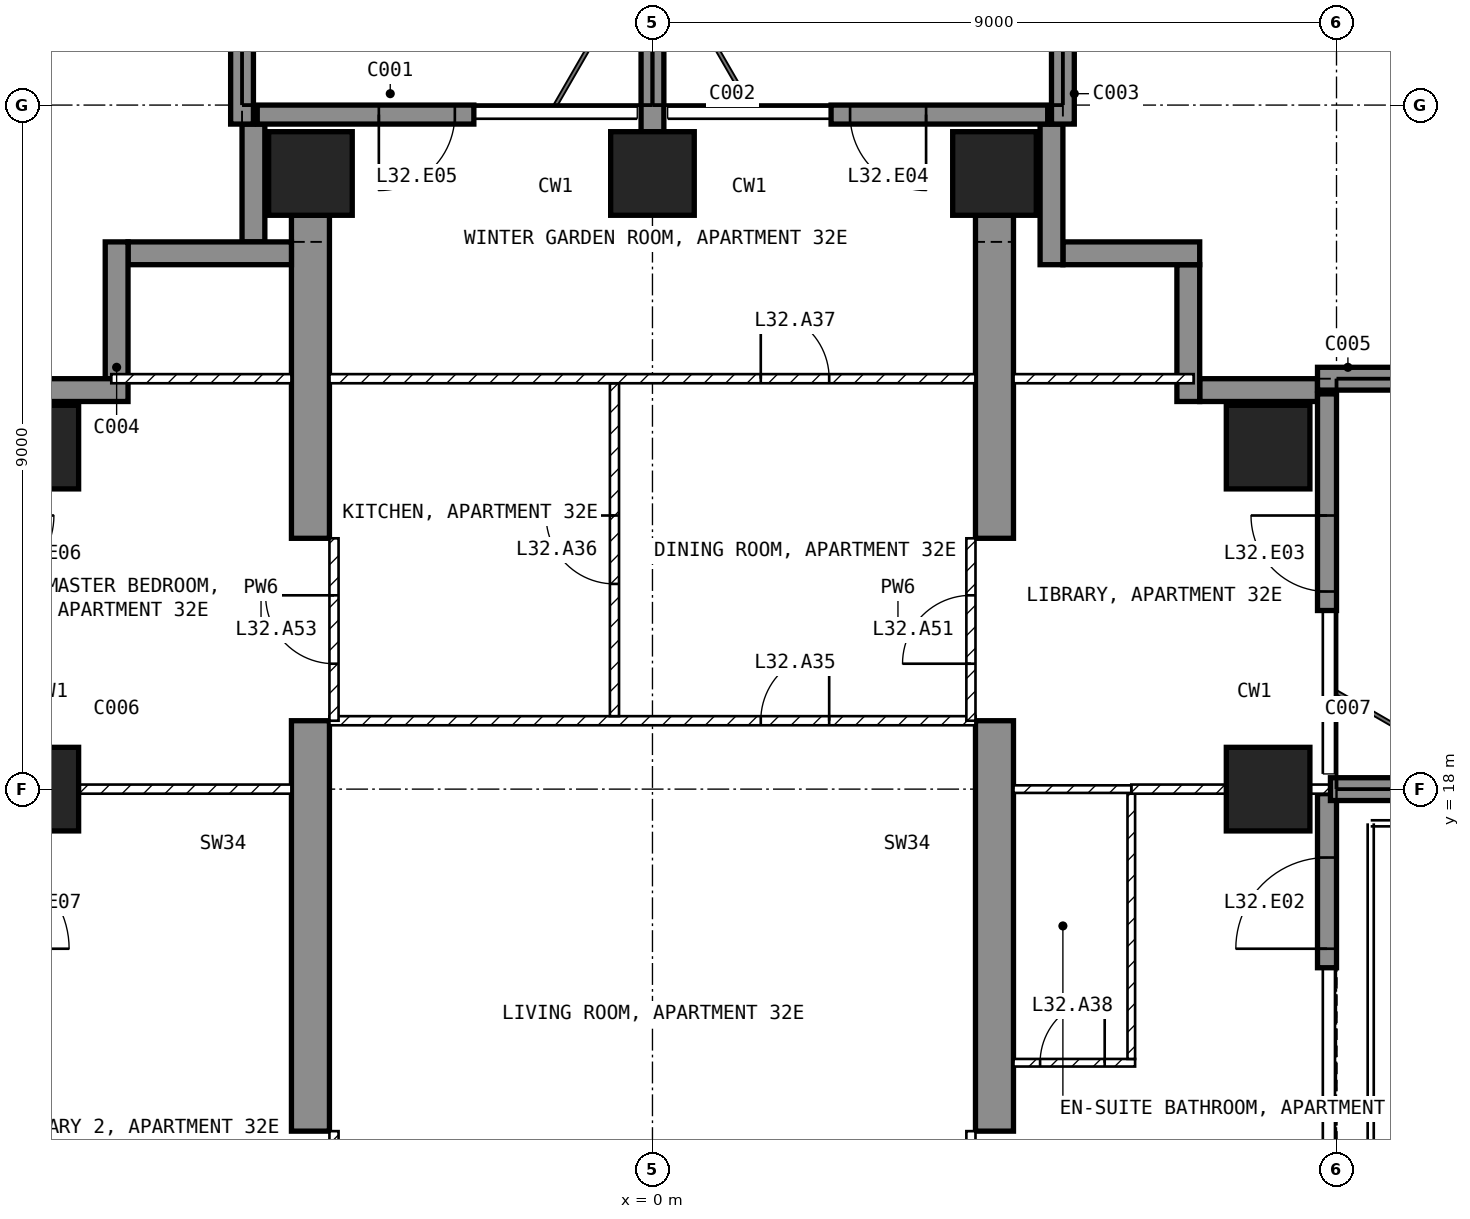
"""IFC4 building model, lengths in metres.
Left out: names, types, materials, properties, quantities, classifications, styles, units other than length and angle.
Written with IfcOpenShell. Run it as: python <this file> out.ifc"""

import sys

from ifc_helpers import new_model, si_unit, direction, frame, frame_2d, origin, origin_2d, place, context, subcontext, project, spatial, polyline, rectangle, outline, extrude, element, fill, save


model = new_model("IFC4")
c1 = context("Model", 3, precision=1e-05, world=origin(), true_north=direction((0.0, 1.0)))
c2 = subcontext(c1, "Body", "Model", "MODEL_VIEW")
j1 = project(units=[si_unit("LENGTHUNIT", "METRE"), si_unit("PLANEANGLEUNIT", "RADIAN")], contexts=[c1])
p1 = place(None, origin())
s1 = spatial("IfcSite", under=j1, at=p1, CompositionType="ELEMENT")
p2 = place(p1, origin())
s2 = spatial("IfcBuilding", under=s1, at=p2, CompositionType="ELEMENT")
p3 = place(p2, frame((0.0, 0.0, 133.9)))
s3 = spatial("IfcBuildingStorey", under=s2, at=p3, CompositionType="ELEMENT", Elevation=133.9)
for number, where, z_axis, x_axis in (
    (1, (-8.1, 18.0, -0.25), (0.0, 0.0, 1.0), (1.0, 0.0, 0.0)),
    (2, (-8.1, 22.5, -0.25), (0.0, 0.0, 1.0), (1.0, 0.0, 0.0)),
    (3, (-4.5, 26.1, -0.25), (0.0, 0.0, 1.0), (1.0, 0.0, 0.0)),
    (4, (0.0, 26.1, -0.25), (0.0, 0.0, 1.0), (1.0, 0.0, 0.0)),
    (5, (4.5, 26.1, -0.25), (0.0, 0.0, 1.0), (1.0, 0.0, 0.0)),
    (6, (8.1, 18.0, -0.25), (0.0, 0.0, 1.0), (1.0, 0.0, 0.0)),
    (7, (8.1, 22.5, -0.25), (0.0, 0.0, 1.0), (1.0, 0.0, 0.0)),
):
    element("IfcColumn", number, at=place(p3, frame(where, z_axis=z_axis, x_axis=x_axis)), inside=s3, PredefinedType="COLUMN", context=c2, shape_type="SweptSolid", body=[
        extrude(rectangle(XDim=1.1, YDim=1.1, at=origin_2d()), origin(), (0.0, 0.0, 1.0), 3.5),
    ])
for number, where, z_axis, x_axis in (
    (8, (-4.75, 9.0, -0.25), (1.0, 0.0, 0.0), (0.0, 1.0, 0.0)),
    (9, (4.25, 9.0, -0.25), (1.0, 0.0, 0.0), (0.0, 1.0, 0.0)),
):
    element("IfcWall", number, at=place(p3, frame(where, z_axis=z_axis, x_axis=x_axis)), inside=s3, PredefinedType="SHEAR", context=c2, shape_type="SweptSolid", body=[
        extrude(outline(polyline([(0.0, 0.0), (2.1, 0.0), (2.1, 2.65), (4.5, 2.65), (4.5, 0.0), (9.9, 0.0), (9.9, 2.65), (12.3, 2.65), (12.3, 0.0), (16.55, 0.0), (16.55, 3.5), (0.0, 3.5), (0.0, 0.0)])), origin(), (0.0, 0.0, 1.0), 0.5),
    ])
p4 = place(p3, frame((8.875, 15.65, 0.0), z_axis=(0.0, 0.0, 1.0), x_axis=(0.0, 1.0, 0.0)))
e10 = element("IfcWall", 10, at=p4, inside=s3, PredefinedType="SOLIDWALL", context=c2, shape_type="SweptSolid", body=[
    extrude(rectangle(XDim=2.29, YDim=0.25, at=frame_2d((1.145, 0.0))), origin(), (0.0, 0.0, 1.0), 3.25),
])
p5 = place(p4, frame((0.25, 0.0, 0.0)))
e11 = element("IfcOpeningElement", 11, at=p5, cuts=e10, PredefinedType="OPENING", context=c2, shape_type="SweptSolid", body=[
    extrude(rectangle(XDim=1.2, YDim=2.4, at=frame_2d((0.6, 1.2))), frame((0.0, 0.135, 0.0), z_axis=(0.0, -1.0, 0.0), x_axis=(1.0, 0.0, 0.0)), (0.0, 0.0, 1.0), 0.27),
])
p6 = place(p3, frame((8.875, 20.35, 0.0), z_axis=(0.0, 0.0, 1.0), x_axis=(0.0, 1.0, 0.0)))
e12 = element("IfcWall", 12, at=p6, inside=s3, PredefinedType="SOLIDWALL", context=c2, shape_type="SweptSolid", body=[
    extrude(rectangle(XDim=2.85, YDim=0.25, at=frame_2d((1.425, 0.0))), origin(), (0.0, 0.0, 1.0), 3.25),
])
p7 = place(p6, frame((0.25, 0.0, 0.0)))
e13 = element("IfcOpeningElement", 13, at=p7, cuts=e12, PredefinedType="OPENING", context=c2, shape_type="SweptSolid", body=[
    extrude(rectangle(XDim=1.0, YDim=2.4, at=frame_2d((0.5, 1.2))), frame((0.0, 0.135, 0.0), z_axis=(0.0, -1.0, 0.0), x_axis=(1.0, 0.0, 0.0)), (0.0, 0.0, 1.0), 0.27),
])
p8 = place(p3, frame((5.2, 26.875, 0.0), z_axis=(0.0, 0.0, 1.0), x_axis=(-1.0, 0.0, 0.0)))
e14 = element("IfcWall", 14, at=p8, inside=s3, PredefinedType="SOLIDWALL", context=c2, shape_type="SweptSolid", body=[
    extrude(rectangle(XDim=2.85, YDim=0.25, at=frame_2d((1.425, 0.0))), origin(), (0.0, 0.0, 1.0), 3.25),
])
p9 = place(p8, frame((1.6, 0.0, 0.0)))
e15 = element("IfcOpeningElement", 15, at=p9, cuts=e14, PredefinedType="OPENING", context=c2, shape_type="SweptSolid", body=[
    extrude(rectangle(XDim=1.0, YDim=2.4, at=frame_2d((0.5, 1.2))), frame((0.0, 0.135, 0.0), z_axis=(0.0, -1.0, 0.0), x_axis=(1.0, 0.0, 0.0)), (0.0, 0.0, 1.0), 0.27),
])
p10 = place(p3, frame((-2.35, 26.875, 0.0), z_axis=(0.0, 0.0, 1.0), x_axis=(-1.0, 0.0, 0.0)))
e16 = element("IfcWall", 16, at=p10, inside=s3, PredefinedType="SOLIDWALL", context=c2, shape_type="SweptSolid", body=[
    extrude(rectangle(XDim=2.85, YDim=0.25, at=frame_2d((1.425, 0.0))), origin(), (0.0, 0.0, 1.0), 3.25),
])
p11 = place(p10, frame((0.25, 0.0, 0.0)))
e17 = element("IfcOpeningElement", 17, at=p11, cuts=e16, PredefinedType="OPENING", context=c2, shape_type="SweptSolid", body=[
    extrude(rectangle(XDim=1.0, YDim=2.4, at=frame_2d((0.5, 1.2))), frame((0.0, 0.135, 0.0), z_axis=(0.0, -1.0, 0.0), x_axis=(1.0, 0.0, 0.0)), (0.0, 0.0, 1.0), 0.27),
])
p12 = place(p3, frame((8.75, 23.25, 0.0), z_axis=(0.0, 0.0, 1.0), x_axis=(-1.0, 0.0, 0.0)))
e18 = element("IfcWall", 18, at=p12, inside=s3, PredefinedType="SOLIDWALL", context=c2, shape_type="SweptSolid", body=[
    extrude(rectangle(XDim=1.55, YDim=0.3, at=frame_2d((0.775, 0.0))), origin(), (0.0, 0.0, 1.0), 3.25),
])
p13 = place(p3, frame((7.05, 23.1, 0.0), z_axis=(0.0, 0.0, 1.0), x_axis=(0.0, 1.0, 0.0)))
e19 = element("IfcWall", 19, at=p13, inside=s3, PredefinedType="SOLIDWALL", context=c2, shape_type="SweptSolid", body=[
    extrude(rectangle(XDim=1.8, YDim=0.3, at=frame_2d((0.9, 0.0))), origin(), (0.0, 0.0, 1.0), 3.25),
])
p14 = place(p3, frame((7.2, 25.05, 0.0), z_axis=(0.0, 0.0, 1.0), x_axis=(-1.0, 0.0, 0.0)))
e20 = element("IfcWall", 20, at=p14, inside=s3, PredefinedType="SOLIDWALL", context=c2, shape_type="SweptSolid", body=[
    extrude(rectangle(XDim=1.8, YDim=0.3, at=frame_2d((0.9, 0.0))), origin(), (0.0, 0.0, 1.0), 3.25),
])
p15 = place(p3, frame((5.25, 24.9, 0.0), z_axis=(0.0, 0.0, 1.0), x_axis=(0.0, 1.0, 0.0)))
e21 = element("IfcWall", 21, at=p15, inside=s3, PredefinedType="SOLIDWALL", context=c2, shape_type="SweptSolid", body=[
    extrude(rectangle(XDim=1.85, YDim=0.3, at=frame_2d((0.925, 0.0))), origin(), (0.0, 0.0, 1.0), 3.25),
])
p16 = place(p3, frame((-5.25, 26.75, 0.0), z_axis=(0.0, 0.0, 1.0), x_axis=(0.0, -1.0, 0.0)))
e22 = element("IfcWall", 22, at=p16, inside=s3, PredefinedType="SOLIDWALL", context=c2, shape_type="SweptSolid", body=[
    extrude(rectangle(XDim=1.55, YDim=0.3, at=frame_2d((0.775, 0.0))), origin(), (0.0, 0.0, 1.0), 3.25),
])
p17 = place(p3, frame((-4.75, 25.05, 0.0), z_axis=(0.0, 0.0, 1.0), x_axis=(-1.0, 0.0, 0.0)))
e23 = element("IfcWall", 23, at=p17, inside=s3, PredefinedType="SOLIDWALL", context=c2, shape_type="SweptSolid", body=[
    extrude(rectangle(XDim=2.15, YDim=0.3, at=frame_2d((1.075, 0.0))), origin(), (0.0, 0.0, 1.0), 3.25),
])
p18 = place(p3, frame((-7.05, 25.2, 0.0), z_axis=(0.0, 0.0, 1.0), x_axis=(0.0, -1.0, 0.0)))
e24 = element("IfcWall", 24, at=p18, inside=s3, PredefinedType="SOLIDWALL", context=c2, shape_type="SweptSolid", body=[
    extrude(rectangle(XDim=1.8, YDim=0.3, at=frame_2d((0.9, 0.0))), origin(), (0.0, 0.0, 1.0), 3.25),
])
p19 = place(p3, frame((-6.9, 23.25, 0.0), z_axis=(0.0, 0.0, 1.0), x_axis=(-1.0, 0.0, 0.0)))
e25 = element("IfcWall", 25, at=p19, inside=s3, PredefinedType="SOLIDWALL", context=c2, shape_type="SweptSolid", body=[
    extrude(rectangle(XDim=1.85, YDim=0.3, at=frame_2d((0.925, 0.0))), origin(), (0.0, 0.0, 1.0), 3.25),
])
p20 = place(p3, frame((-5.4, 26.75, 0.0), z_axis=(0.0, 0.0, 1.0), x_axis=(0.0, 1.0, 0.0)))
e26 = element("IfcWall", 26, at=p20, inside=s3, PredefinedType="SOLIDWALL", context=c2, shape_type="SweptSolid", body=[
    extrude(rectangle(XDim=2.95, YDim=0.3, at=frame_2d((1.475, 0.0))), origin(), (0.0, 0.0, 1.0), 3.25),
])
p21 = place(p3, frame((0.0, 26.65, 0.0), z_axis=(0.0, 0.0, 1.0), x_axis=(0.0, 1.0, 0.0)))
e27 = element("IfcWall", 27, at=p21, inside=s3, PredefinedType="SOLIDWALL", context=c2, shape_type="SweptSolid", body=[
    extrude(rectangle(XDim=3.05, YDim=0.3, at=frame_2d((1.525, 0.0))), origin(), (0.0, 0.0, 1.0), 3.25),
])
p22 = place(p3, frame((5.4, 26.75, 0.0), z_axis=(0.0, 0.0, 1.0), x_axis=(0.0, 1.0, 0.0)))
e28 = element("IfcWall", 28, at=p22, inside=s3, PredefinedType="SOLIDWALL", context=c2, shape_type="SweptSolid", body=[
    extrude(rectangle(XDim=2.95, YDim=0.3, at=frame_2d((1.475, 0.0))), origin(), (0.0, 0.0, 1.0), 3.25),
])
p23 = place(p3, frame((8.92, 18.0, 0.0), z_axis=(0.0, 0.0, 1.0), x_axis=(1.0, 0.0, 0.0)))
e29 = element("IfcWall", 29, at=p23, inside=s3, PredefinedType="SOLIDWALL", context=c2, shape_type="SweptSolid", body=[
    extrude(rectangle(XDim=2.82, YDim=0.3, at=frame_2d((1.41, 0.0))), origin(), (0.0, 0.0, 1.0), 3.25),
])
p24 = place(p3, frame((8.75, 23.4, 0.0), z_axis=(0.0, 0.0, 1.0), x_axis=(1.0, 0.0, 0.0)))
e30 = element("IfcWall", 30, at=p24, inside=s3, PredefinedType="SOLIDWALL", context=c2, shape_type="SweptSolid", body=[
    extrude(rectangle(XDim=2.95, YDim=0.3, at=frame_2d((1.475, 0.0))), origin(), (0.0, 0.0, 1.0), 3.25),
])
p25 = place(p3, frame((-4.25, 18.9, 0.0), z_axis=(0.0, 0.0, 1.0), x_axis=(1.0, 0.0, 0.0)))
e31 = element("IfcWall", 31, at=p25, inside=s3, PredefinedType="PARTITIONING", context=c2, shape_type="SweptSolid", body=[
    extrude(rectangle(XDim=8.5, YDim=0.12, at=frame_2d((4.25, 0.0))), origin(), (0.0, 0.0, 1.0), 3.25),
])
p26 = place(p25, frame((5.675, 0.0, 0.0)))
e32 = element("IfcOpeningElement", 32, at=p26, cuts=e31, PredefinedType="OPENING", context=c2, shape_type="SweptSolid", body=[
    extrude(rectangle(XDim=0.9, YDim=2.1, at=frame_2d((0.45, 1.05))), frame((0.0, 0.07, 0.0), z_axis=(0.0, -1.0, 0.0), x_axis=(1.0, 0.0, 0.0)), (0.0, 0.0, 1.0), 0.14),
])
p27 = place(p3, frame((-0.5, 18.96, 0.0), z_axis=(0.0, 0.0, 1.0), x_axis=(0.0, 1.0, 0.0)))
e33 = element("IfcWall", 33, at=p27, inside=s3, PredefinedType="PARTITIONING", context=c2, shape_type="SweptSolid", body=[
    extrude(rectangle(XDim=4.38, YDim=0.12, at=frame_2d((2.19, 0.0))), origin(), (0.0, 0.0, 1.0), 3.25),
])
p28 = place(p27, frame((1.74, 0.0, 0.0)))
e34 = element("IfcOpeningElement", 34, at=p28, cuts=e33, PredefinedType="OPENING", context=c2, shape_type="SweptSolid", body=[
    extrude(rectangle(XDim=0.9, YDim=2.1, at=frame_2d((0.45, 1.05))), frame((0.0, 0.07, 0.0), z_axis=(0.0, -1.0, 0.0), x_axis=(1.0, 0.0, 0.0)), (0.0, 0.0, 1.0), 0.14),
])
p29 = place(p3, frame((-4.25, 23.4, 0.0), z_axis=(0.0, 0.0, 1.0), x_axis=(1.0, 0.0, 0.0)))
e35 = element("IfcWall", 35, at=p29, inside=s3, PredefinedType="PARTITIONING", context=c2, shape_type="SweptSolid", body=[
    extrude(rectangle(XDim=8.5, YDim=0.12, at=frame_2d((4.25, 0.0))), origin(), (0.0, 0.0, 1.0), 3.25),
])
p30 = place(p29, frame((5.675, 0.0, 0.0)))
e36 = element("IfcOpeningElement", 36, at=p30, cuts=e35, PredefinedType="OPENING", context=c2, shape_type="SweptSolid", body=[
    extrude(rectangle(XDim=0.9, YDim=2.1, at=frame_2d((0.45, 1.05))), frame((0.0, 0.07, 0.0), z_axis=(0.0, -1.0, 0.0), x_axis=(1.0, 0.0, 0.0)), (0.0, 0.0, 1.0), 0.14),
])
p31 = place(p3, frame((4.75, 14.4, 0.0), z_axis=(0.0, 0.0, 1.0), x_axis=(1.0, 0.0, 0.0)))
e37 = element("IfcWall", 37, at=p31, inside=s3, PredefinedType="PARTITIONING", context=c2, shape_type="SweptSolid", body=[
    extrude(rectangle(XDim=1.6, YDim=0.1, at=frame_2d((0.8, 0.0))), origin(), (0.0, 0.0, 1.0), 3.25),
])
p32 = place(p31, frame((0.35, 0.0, 0.0)))
e38 = element("IfcOpeningElement", 38, at=p32, cuts=e37, PredefinedType="OPENING", context=c2, shape_type="SweptSolid", body=[
    extrude(rectangle(XDim=0.85, YDim=2.1, at=frame_2d((0.425, 1.05))), frame((0.0, 0.06, 0.0), z_axis=(0.0, -1.0, 0.0), x_axis=(1.0, 0.0, 0.0)), (0.0, 0.0, 1.0), 0.12),
])
p33 = place(p3, frame((6.3, 14.45, 0.0), z_axis=(0.0, 0.0, 1.0), x_axis=(0.0, 1.0, 0.0)))
e39 = element("IfcWall", 39, at=p33, inside=s3, PredefinedType="PARTITIONING", context=c2, shape_type="SweptSolid", body=[
    extrude(rectangle(XDim=3.49, YDim=0.1, at=frame_2d((1.745, 0.0))), origin(), (0.0, 0.0, 1.0), 3.25),
])
p34 = place(p3, frame((6.3, 18.0, 0.0), z_axis=(0.0, 0.0, 1.0), x_axis=(1.0, 0.0, 0.0)))
e40 = element("IfcWall", 40, at=p34, inside=s3, PredefinedType="PARTITIONING", context=c2, shape_type="SweptSolid", body=[
    extrude(rectangle(XDim=2.62, YDim=0.12, at=frame_2d((1.31, 0.0))), origin(), (0.0, 0.0, 1.0), 2.414),
])
p35 = place(p3, frame((4.75, 18.0, 0.0), z_axis=(0.0, 0.0, 1.0), x_axis=(1.0, 0.0, 0.0)))
e41 = element("IfcWall", 41, at=p35, inside=s3, PredefinedType="PARTITIONING", context=c2, shape_type="SweptSolid", body=[
    extrude(rectangle(XDim=1.55, YDim=0.1, at=frame_2d((0.775, 0.0))), origin(), (0.0, 0.0, 1.0), 2.414),
])
p36 = place(p3, frame((4.75, 23.4, 0.0), z_axis=(0.0, 0.0, 1.0), x_axis=(1.0, 0.0, 0.0)))
e42 = element("IfcWall", 42, at=p36, inside=s3, PredefinedType="PARTITIONING", context=c2, shape_type="SweptSolid", body=[
    extrude(rectangle(XDim=2.37, YDim=0.12, at=frame_2d((1.185, 0.0))), origin(), (0.0, 0.0, 1.0), 3.25),
])
p37 = place(p3, frame((-8.92, 18.0, 0.0), z_axis=(0.0, 0.0, 1.0), x_axis=(1.0, 0.0, 0.0)))
e43 = element("IfcWall", 43, at=p37, inside=s3, PredefinedType="PARTITIONING", context=c2, shape_type="SweptSolid", body=[
    extrude(rectangle(XDim=4.17, YDim=0.12, at=frame_2d((2.085, 0.0))), origin(), (0.0, 0.0, 1.0), 2.414),
])
p38 = place(p3, frame((-7.12, 23.4, 0.0), z_axis=(0.0, 0.0, 1.0), x_axis=(1.0, 0.0, 0.0)))
e44 = element("IfcWall", 44, at=p38, inside=s3, PredefinedType="PARTITIONING", context=c2, shape_type="SweptSolid", body=[
    extrude(rectangle(XDim=2.37, YDim=0.12, at=frame_2d((1.185, 0.0))), origin(), (0.0, 0.0, 1.0), 3.25),
])
p39 = place(p3, frame((4.19, 11.1, 0.0), z_axis=(0.0, 0.0, 1.0), x_axis=(0.0, 1.0, 0.0)))
e45 = element("IfcWall", 45, at=p39, inside=s3, PredefinedType="PARTITIONING", context=c2, shape_type="SweptSolid", body=[
    extrude(rectangle(XDim=2.4, YDim=0.12, at=frame_2d((1.2, 0.0))), origin(), (0.0, 0.0, 1.0), 2.4),
])
p40 = place(p39, frame((0.75, 0.0, 0.0)))
e46 = element("IfcOpeningElement", 46, at=p40, cuts=e45, PredefinedType="OPENING", context=c2, shape_type="SweptSolid", body=[
    extrude(rectangle(XDim=0.9, YDim=2.1, at=frame_2d((0.45, 1.05))), frame((0.0, 0.07, 0.0), z_axis=(0.0, -1.0, 0.0), x_axis=(1.0, 0.0, 0.0)), (0.0, 0.0, 1.0), 0.14),
])
p41 = place(p3, frame((4.19, 18.9, 0.0), z_axis=(0.0, 0.0, 1.0), x_axis=(0.0, 1.0, 0.0)))
e47 = element("IfcWall", 47, at=p41, inside=s3, PredefinedType="PARTITIONING", context=c2, shape_type="SweptSolid", body=[
    extrude(rectangle(XDim=2.4, YDim=0.12, at=frame_2d((1.2, 0.0))), origin(), (0.0, 0.0, 1.0), 2.4),
])
p42 = place(p41, frame((0.75, 0.0, 0.0)))
e48 = element("IfcOpeningElement", 48, at=p42, cuts=e47, PredefinedType="OPENING", context=c2, shape_type="SweptSolid", body=[
    extrude(rectangle(XDim=0.9, YDim=2.1, at=frame_2d((0.45, 1.05))), frame((0.0, 0.07, 0.0), z_axis=(0.0, -1.0, 0.0), x_axis=(1.0, 0.0, 0.0)), (0.0, 0.0, 1.0), 0.14),
])
p43 = place(p3, frame((-4.19, 11.1, 0.0), z_axis=(0.0, 0.0, 1.0), x_axis=(0.0, 1.0, 0.0)))
e49 = element("IfcWall", 49, at=p43, inside=s3, PredefinedType="PARTITIONING", context=c2, shape_type="SweptSolid", body=[
    extrude(rectangle(XDim=2.4, YDim=0.12, at=frame_2d((1.2, 0.0))), origin(), (0.0, 0.0, 1.0), 2.4),
])
p44 = place(p43, frame((0.75, 0.0, 0.0)))
e50 = element("IfcOpeningElement", 50, at=p44, cuts=e49, PredefinedType="OPENING", context=c2, shape_type="SweptSolid", body=[
    extrude(rectangle(XDim=0.9, YDim=2.1, at=frame_2d((0.45, 1.05))), frame((0.0, 0.07, 0.0), z_axis=(0.0, -1.0, 0.0), x_axis=(1.0, 0.0, 0.0)), (0.0, 0.0, 1.0), 0.14),
])
p45 = place(p3, frame((-4.19, 18.9, 0.0), z_axis=(0.0, 0.0, 1.0), x_axis=(0.0, 1.0, 0.0)))
e51 = element("IfcWall", 51, at=p45, inside=s3, PredefinedType="PARTITIONING", context=c2, shape_type="SweptSolid", body=[
    extrude(rectangle(XDim=2.4, YDim=0.12, at=frame_2d((1.2, 0.0))), origin(), (0.0, 0.0, 1.0), 2.4),
])
p46 = place(p45, frame((0.75, 0.0, 0.0)))
e52 = element("IfcOpeningElement", 52, at=p46, cuts=e51, PredefinedType="OPENING", context=c2, shape_type="SweptSolid", body=[
    extrude(rectangle(XDim=0.9, YDim=2.1, at=frame_2d((0.45, 1.05))), frame((0.0, 0.07, 0.0), z_axis=(0.0, -1.0, 0.0), x_axis=(1.0, 0.0, 0.0)), (0.0, 0.0, 1.0), 0.14),
])
p47 = place(p5, origin())
e53 = element("IfcDoor", 53, at=p47, inside=s3, OperationType="SINGLE_SWING_LEFT", PredefinedType="DOOR", context=c2, shape_type="SweptSolid", body=[
    extrude(rectangle(XDim=1.2, YDim=2.4, at=frame_2d((0.6, 1.2))), frame((0.0, 0.025, 0.0), z_axis=(0.0, -1.0, 0.0), x_axis=(1.0, 0.0, 0.0)), (0.0, 0.0, 1.0), 0.05),
])
fill(e11, e53)
p48 = place(p7, origin())
e54 = element("IfcDoor", 54, at=p48, inside=s3, OperationType="SINGLE_SWING_RIGHT", PredefinedType="DOOR", context=c2, shape_type="SweptSolid", body=[
    extrude(rectangle(XDim=1.0, YDim=2.4, at=frame_2d((0.5, 1.2))), frame((0.0, 0.025, 0.0), z_axis=(0.0, -1.0, 0.0), x_axis=(1.0, 0.0, 0.0)), (0.0, 0.0, 1.0), 0.05),
])
fill(e13, e54)
p49 = place(p9, origin())
e55 = element("IfcDoor", 55, at=p49, inside=s3, OperationType="SINGLE_SWING_LEFT", PredefinedType="DOOR", context=c2, shape_type="SweptSolid", body=[
    extrude(rectangle(XDim=1.0, YDim=2.4, at=frame_2d((0.5, 1.2))), frame((0.0, 0.025, 0.0), z_axis=(0.0, -1.0, 0.0), x_axis=(1.0, 0.0, 0.0)), (0.0, 0.0, 1.0), 0.05),
])
fill(e15, e55)
p50 = place(p11, origin())
e56 = element("IfcDoor", 56, at=p50, inside=s3, OperationType="SINGLE_SWING_RIGHT", PredefinedType="DOOR", context=c2, shape_type="SweptSolid", body=[
    extrude(rectangle(XDim=1.0, YDim=2.4, at=frame_2d((0.5, 1.2))), frame((0.0, 0.025, 0.0), z_axis=(0.0, -1.0, 0.0), x_axis=(1.0, 0.0, 0.0)), (0.0, 0.0, 1.0), 0.05),
])
fill(e17, e56)
p51 = place(p26, origin())
e57 = element("IfcDoor", 57, at=p51, inside=s3, OperationType="SINGLE_SWING_RIGHT", PredefinedType="DOOR", context=c2, shape_type="SweptSolid", body=[
    extrude(rectangle(XDim=0.9, YDim=2.1, at=frame_2d((0.45, 1.05))), frame((0.0, 0.025, 0.0), z_axis=(0.0, -1.0, 0.0), x_axis=(1.0, 0.0, 0.0)), (0.0, 0.0, 1.0), 0.05),
])
fill(e32, e57)
p52 = place(p28, origin())
e58 = element("IfcDoor", 58, at=p52, inside=s3, OperationType="SINGLE_SWING_RIGHT", PredefinedType="DOOR", context=c2, shape_type="SweptSolid", body=[
    extrude(rectangle(XDim=0.9, YDim=2.1, at=frame_2d((0.45, 1.05))), frame((0.0, 0.025, 0.0), z_axis=(0.0, -1.0, 0.0), x_axis=(1.0, 0.0, 0.0)), (0.0, 0.0, 1.0), 0.05),
])
fill(e34, e58)
p53 = place(p30, origin())
e59 = element("IfcDoor", 59, at=p53, inside=s3, OperationType="SINGLE_SWING_LEFT", PredefinedType="DOOR", context=c2, shape_type="SweptSolid", body=[
    extrude(rectangle(XDim=0.9, YDim=2.1, at=frame_2d((0.45, 1.05))), frame((0.0, 0.025, 0.0), z_axis=(0.0, -1.0, 0.0), x_axis=(1.0, 0.0, 0.0)), (0.0, 0.0, 1.0), 0.05),
])
fill(e36, e59)
p54 = place(p32, origin())
e60 = element("IfcDoor", 60, at=p54, inside=s3, OperationType="SINGLE_SWING_RIGHT", PredefinedType="DOOR", context=c2, shape_type="SweptSolid", body=[
    extrude(rectangle(XDim=0.85, YDim=2.1, at=frame_2d((0.425, 1.05))), frame((0.0, 0.025, 0.0), z_axis=(0.0, -1.0, 0.0), x_axis=(1.0, 0.0, 0.0)), (0.0, 0.0, 1.0), 0.05),
])
fill(e38, e60)
p55 = place(p42, origin())
e61 = element("IfcDoor", 61, at=p55, inside=s3, OperationType="SINGLE_SWING_LEFT", PredefinedType="DOOR", context=c2, shape_type="SweptSolid", body=[
    extrude(rectangle(XDim=0.9, YDim=2.1, at=frame_2d((0.45, 1.05))), frame((0.0, 0.025, 0.0), z_axis=(0.0, -1.0, 0.0), x_axis=(1.0, 0.0, 0.0)), (0.0, 0.0, 1.0), 0.05),
])
fill(e48, e61)
p56 = place(p46, origin())
e62 = element("IfcDoor", 62, at=p56, inside=s3, OperationType="SINGLE_SWING_RIGHT", PredefinedType="DOOR", context=c2, shape_type="SweptSolid", body=[
    extrude(rectangle(XDim=0.9, YDim=2.1, at=frame_2d((0.45, 1.05))), frame((0.0, 0.025, 0.0), z_axis=(0.0, -1.0, 0.0), x_axis=(1.0, 0.0, 0.0)), (0.0, 0.0, 1.0), 0.05),
])
fill(e52, e62)
save(model, sys.argv[1])
